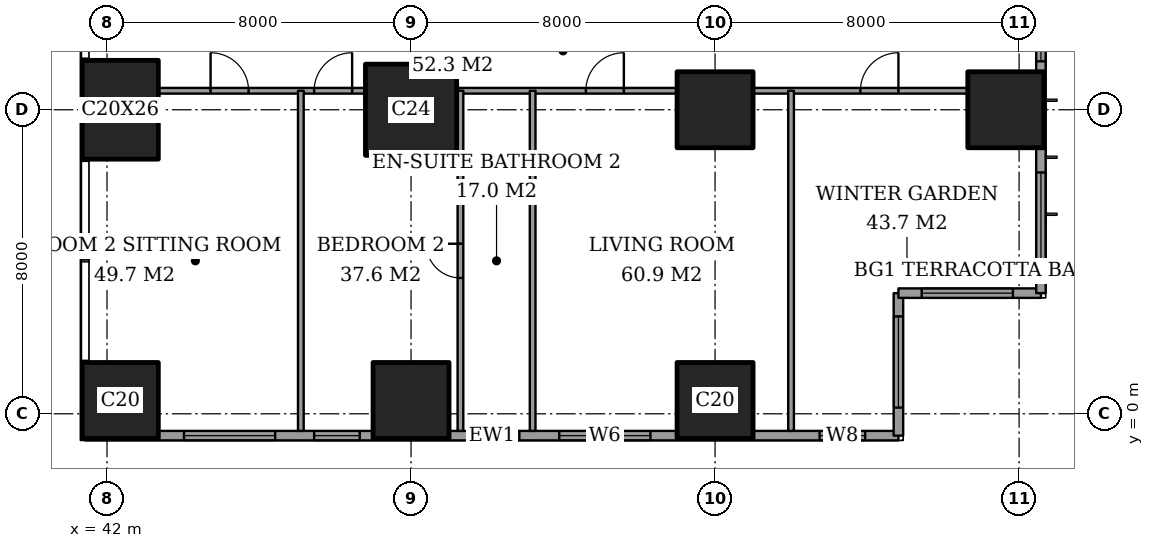
"""IFC4 building model, lengths in metres.
Left out: names, types, materials, properties, quantities, classifications, styles, units other than length and angle.
Written with IfcOpenShell. Run it as: python <this file> out.ifc"""

import sys

from ifc_helpers import new_model, si_unit, direction, frame, frame_2d, origin, origin_2d, place, context, subcontext, project, spatial, rectangle, extrude, element, fill, save


model = new_model("IFC4")
c1 = context("Model", 3, precision=1e-05, world=origin(), true_north=direction((0.0, 1.0)))
c2 = subcontext(c1, "Body", "Model", "MODEL_VIEW")
j1 = project(units=[si_unit("LENGTHUNIT", "METRE"), si_unit("PLANEANGLEUNIT", "RADIAN")], contexts=[c1])
p1 = place(None, origin())
s1 = spatial("IfcSite", under=j1, at=p1, CompositionType="ELEMENT")
p2 = place(p1, origin())
s2 = spatial("IfcBuilding", under=s1, at=p2, CompositionType="ELEMENT")
p3 = place(p2, frame((0.0, 0.0, 58.4)))
s3 = spatial("IfcBuildingStorey", under=s2, at=p3, CompositionType="ELEMENT", Elevation=58.4)
p4 = place(p3, frame((42.35, 0.35, 0.0), z_axis=(0.0, 0.0, 1.0), x_axis=(1.0, 0.0, 0.0)))
e1 = element("IfcColumn", 1, at=p4, inside=s3, PredefinedType="COLUMN", context=c2, shape_type="SweptSolid", body=[
    extrude(rectangle(XDim=2.0, YDim=2.0, at=origin_2d()), origin(), (0.0, 0.0, 1.0), 3.6),
])
p5 = place(p3, frame((42.35, 8.0, 0.0), z_axis=(0.0, 0.0, 1.0), x_axis=(1.0, 0.0, 0.0)))
e2 = element("IfcColumn", 2, at=p5, inside=s3, PredefinedType="COLUMN", context=c2, shape_type="SweptSolid", body=[
    extrude(rectangle(XDim=2.0, YDim=2.6, at=origin_2d()), origin(), (0.0, 0.0, 1.0), 3.6),
])
p6 = place(p3, frame((50.0, 0.35, 0.0), z_axis=(0.0, 0.0, 1.0), x_axis=(1.0, 0.0, 0.0)))
e3 = element("IfcColumn", 3, at=p6, inside=s3, PredefinedType="COLUMN", context=c2, shape_type="SweptSolid", body=[
    extrude(rectangle(XDim=2.0, YDim=2.0, at=origin_2d()), origin(), (0.0, 0.0, 1.0), 3.6),
])
p7 = place(p3, frame((50.0, 8.0, 0.0), z_axis=(0.0, 0.0, 1.0), x_axis=(1.0, 0.0, 0.0)))
e4 = element("IfcColumn", 4, at=p7, inside=s3, PredefinedType="COLUMN", context=c2, shape_type="SweptSolid", body=[
    extrude(rectangle(XDim=2.4, YDim=2.4, at=origin_2d()), origin(), (0.0, 0.0, 1.0), 3.6),
])
for number, where, z_axis, x_axis in (
    (5, (58.0, 0.35, 0.0), (0.0, 0.0, 1.0), (1.0, 0.0, 0.0)),
    (6, (58.0, 8.0, 0.0), (0.0, 0.0, 1.0), (1.0, 0.0, 0.0)),
    (7, (65.65, 8.0, 0.0), (0.0, 0.0, 1.0), (1.0, 0.0, 0.0)),
):
    element("IfcColumn", number, at=place(p3, frame(where, z_axis=z_axis, x_axis=x_axis)), inside=s3, PredefinedType="COLUMN", context=c2, shape_type="SweptSolid", body=[
        extrude(rectangle(XDim=2.0, YDim=2.0, at=origin_2d()), origin(), (0.0, 0.0, 1.0), 3.6),
    ])
p8 = place(p3, frame((41.425, -0.575, 0.0), z_axis=(0.0, 0.0, 1.0), x_axis=(1.0, 0.0, 0.0)))
e8 = element("IfcWall", 8, at=p8, inside=s3, PredefinedType="SOLIDWALL", context=c2, shape_type="SweptSolid", body=[
    extrude(rectangle(XDim=21.4, YDim=0.25, at=frame_2d((10.7, 0.0))), origin(), (0.0, 0.0, 1.0), 3.6),
])
p9 = place(p8, frame((2.6, 0.0, 0.6)))
e9 = element("IfcOpeningElement", 9, at=p9, cuts=e8, PredefinedType="OPENING", context=c2, shape_type="SweptSolid", body=[
    extrude(rectangle(XDim=2.4, YDim=2.0, at=frame_2d((1.2, 1.0))), frame((0.0, 0.135, 0.0), z_axis=(0.0, -1.0, 0.0), x_axis=(1.0, 0.0, 0.0)), (0.0, 0.0, 1.0), 0.27),
])
p10 = place(p8, frame((6.025, 0.0, 0.6)))
e10 = element("IfcOpeningElement", 10, at=p10, cuts=e8, PredefinedType="OPENING", context=c2, shape_type="SweptSolid", body=[
    extrude(rectangle(XDim=1.2, YDim=2.0, at=frame_2d((0.6, 1.0))), frame((0.0, 0.135, 0.0), z_axis=(0.0, -1.0, 0.0), x_axis=(1.0, 0.0, 0.0)), (0.0, 0.0, 1.0), 0.27),
])
p11 = place(p8, frame((10.225, 0.0, 0.6)))
e11 = element("IfcOpeningElement", 11, at=p11, cuts=e8, PredefinedType="OPENING", context=c2, shape_type="SweptSolid", body=[
    extrude(rectangle(XDim=1.2, YDim=2.0, at=frame_2d((0.6, 1.0))), frame((0.0, 0.135, 0.0), z_axis=(0.0, -1.0, 0.0), x_axis=(1.0, 0.0, 0.0)), (0.0, 0.0, 1.0), 0.27),
])
p12 = place(p8, frame((12.475, 0.0, 0.6)))
e12 = element("IfcOpeningElement", 12, at=p12, cuts=e8, PredefinedType="OPENING", context=c2, shape_type="SweptSolid", body=[
    extrude(rectangle(XDim=2.4, YDim=2.0, at=frame_2d((1.2, 1.0))), frame((0.0, 0.135, 0.0), z_axis=(0.0, -1.0, 0.0), x_axis=(1.0, 0.0, 0.0)), (0.0, 0.0, 1.0), 0.27),
])
p13 = place(p8, frame((19.325, 0.0, 0.6)))
e13 = element("IfcOpeningElement", 13, at=p13, cuts=e8, PredefinedType="OPENING", context=c2, shape_type="SweptSolid", body=[
    extrude(rectangle(XDim=1.2, YDim=2.0, at=frame_2d((0.6, 1.0))), frame((0.0, 0.135, 0.0), z_axis=(0.0, -1.0, 0.0), x_axis=(1.0, 0.0, 0.0)), (0.0, 0.0, 1.0), 0.27),
])
p14 = place(p3, frame((62.825, -0.575, 0.0), z_axis=(0.0, 0.0, 1.0), x_axis=(0.0, 1.0, 0.0)))
e14 = element("IfcWall", 14, at=p14, inside=s3, PredefinedType="SOLIDWALL", context=c2, shape_type="SweptSolid", body=[
    extrude(rectangle(XDim=3.75, YDim=0.25, at=frame_2d((1.875, 0.0))), origin(), (0.0, 0.0, 1.0), 3.6),
])
p15 = place(p14, frame((0.738, 0.0, 0.6)))
e15 = element("IfcOpeningElement", 15, at=p15, cuts=e14, PredefinedType="OPENING", context=c2, shape_type="SweptSolid", body=[
    extrude(rectangle(XDim=2.4, YDim=2.0, at=frame_2d((1.2, 1.0))), frame((0.0, 0.135, 0.0), z_axis=(0.0, -1.0, 0.0), x_axis=(1.0, 0.0, 0.0)), (0.0, 0.0, 1.0), 0.27),
])
p16 = place(p3, frame((62.825, 3.175, 0.0), z_axis=(0.0, 0.0, 1.0), x_axis=(1.0, 0.0, 0.0)))
e16 = element("IfcWall", 16, at=p16, inside=s3, PredefinedType="SOLIDWALL", context=c2, shape_type="SweptSolid", body=[
    extrude(rectangle(XDim=3.75, YDim=0.25, at=frame_2d((1.875, 0.0))), origin(), (0.0, 0.0, 1.0), 3.6),
])
p17 = place(p16, frame((0.613, 0.0, 0.6)))
e17 = element("IfcOpeningElement", 17, at=p17, cuts=e16, PredefinedType="OPENING", context=c2, shape_type="SweptSolid", body=[
    extrude(rectangle(XDim=2.4, YDim=2.0, at=frame_2d((1.2, 1.0))), frame((0.0, 0.135, 0.0), z_axis=(0.0, -1.0, 0.0), x_axis=(1.0, 0.0, 0.0)), (0.0, 0.0, 1.0), 0.27),
])
p18 = place(p3, frame((66.575, 3.175, 0.0), z_axis=(0.0, 0.0, 1.0), x_axis=(0.0, 1.0, 0.0)))
e18 = element("IfcWall", 18, at=p18, inside=s3, PredefinedType="SOLIDWALL", context=c2, shape_type="SweptSolid", body=[
    extrude(rectangle(XDim=41.65, YDim=0.25, at=frame_2d((20.825, 0.0))), origin(), (0.0, 0.0, 1.0), 3.6),
])
p19 = place(p18, frame((0.775, 0.0, 0.6)))
e19 = element("IfcOpeningElement", 19, at=p19, cuts=e18, PredefinedType="OPENING", context=c2, shape_type="SweptSolid", body=[
    extrude(rectangle(XDim=2.4, YDim=2.0, at=frame_2d((1.2, 1.0))), frame((0.0, 0.135, 0.0), z_axis=(0.0, -1.0, 0.0), x_axis=(1.0, 0.0, 0.0)), (0.0, 0.0, 1.0), 0.27),
])
p20 = place(p18, frame((6.1, 0.0, 0.6)))
e20 = element("IfcOpeningElement", 20, at=p20, cuts=e18, PredefinedType="OPENING", context=c2, shape_type="SweptSolid", body=[
    extrude(rectangle(XDim=1.2, YDim=2.0, at=frame_2d((0.6, 1.0))), frame((0.0, 0.135, 0.0), z_axis=(0.0, -1.0, 0.0), x_axis=(1.0, 0.0, 0.0)), (0.0, 0.0, 1.0), 0.27),
])
p21 = place(p18, frame((8.275, 0.0, 0.6)))
e21 = element("IfcOpeningElement", 21, at=p21, cuts=e18, PredefinedType="OPENING", context=c2, shape_type="SweptSolid", body=[
    extrude(rectangle(XDim=2.4, YDim=2.0, at=frame_2d((1.2, 1.0))), frame((0.0, 0.135, 0.0), z_axis=(0.0, -1.0, 0.0), x_axis=(1.0, 0.0, 0.0)), (0.0, 0.0, 1.0), 0.27),
])
p22 = place(p18, frame((15.775, 0.0, 0.6)))
e22 = element("IfcOpeningElement", 22, at=p22, cuts=e18, PredefinedType="OPENING", context=c2, shape_type="SweptSolid", body=[
    extrude(rectangle(XDim=2.4, YDim=2.0, at=frame_2d((1.2, 1.0))), frame((0.0, 0.135, 0.0), z_axis=(0.0, -1.0, 0.0), x_axis=(1.0, 0.0, 0.0)), (0.0, 0.0, 1.0), 0.27),
])
p23 = place(p18, frame((23.475, 0.0, 0.6)))
e23 = element("IfcOpeningElement", 23, at=p23, cuts=e18, PredefinedType="OPENING", context=c2, shape_type="SweptSolid", body=[
    extrude(rectangle(XDim=2.4, YDim=2.0, at=frame_2d((1.2, 1.0))), frame((0.0, 0.135, 0.0), z_axis=(0.0, -1.0, 0.0), x_axis=(1.0, 0.0, 0.0)), (0.0, 0.0, 1.0), 0.27),
])
p24 = place(p18, frame((30.875, 0.0, 0.6)))
e24 = element("IfcOpeningElement", 24, at=p24, cuts=e18, PredefinedType="OPENING", context=c2, shape_type="SweptSolid", body=[
    extrude(rectangle(XDim=2.4, YDim=2.0, at=frame_2d((1.2, 1.0))), frame((0.0, 0.135, 0.0), z_axis=(0.0, -1.0, 0.0), x_axis=(1.0, 0.0, 0.0)), (0.0, 0.0, 1.0), 0.27),
])
p25 = place(p18, frame((34.325, 0.0, 0.6)))
e25 = element("IfcOpeningElement", 25, at=p25, cuts=e18, PredefinedType="OPENING", context=c2, shape_type="SweptSolid", body=[
    extrude(rectangle(XDim=1.2, YDim=2.0, at=frame_2d((0.6, 1.0))), frame((0.0, 0.135, 0.0), z_axis=(0.0, -1.0, 0.0), x_axis=(1.0, 0.0, 0.0)), (0.0, 0.0, 1.0), 0.27),
])
p26 = place(p18, frame((38.475, 0.0, 0.6)))
e26 = element("IfcOpeningElement", 26, at=p26, cuts=e18, PredefinedType="OPENING", context=c2, shape_type="SweptSolid", body=[
    extrude(rectangle(XDim=2.4, YDim=2.0, at=frame_2d((1.2, 1.0))), frame((0.0, 0.135, 0.0), z_axis=(0.0, -1.0, 0.0), x_axis=(1.0, 0.0, 0.0)), (0.0, 0.0, 1.0), 0.27),
])
p27 = place(p3, frame((43.35, 8.5, 0.0), z_axis=(0.0, 0.0, 1.0), x_axis=(1.0, 0.0, 0.0)))
e27 = element("IfcWall", 27, at=p27, inside=s3, PredefinedType="PARTITIONING", context=c2, shape_type="SweptSolid", body=[
    extrude(rectangle(XDim=5.45, YDim=0.15, at=frame_2d((2.725, 0.0))), origin(), (0.0, 0.0, 1.0), 3.35),
])
p28 = place(p27, frame((4.1, 0.0, 0.0)))
e28 = element("IfcOpeningElement", 28, at=p28, cuts=e27, PredefinedType="OPENING", context=c2, shape_type="SweptSolid", body=[
    extrude(rectangle(XDim=1.0, YDim=2.1, at=frame_2d((0.5, 1.05))), frame((0.0, 0.085, 0.0), z_axis=(0.0, -1.0, 0.0), x_axis=(1.0, 0.0, 0.0)), (0.0, 0.0, 1.0), 0.17),
])
p29 = place(p27, frame((1.375, 0.0, 0.0)))
e29 = element("IfcOpeningElement", 29, at=p29, cuts=e27, PredefinedType="OPENING", context=c2, shape_type="SweptSolid", body=[
    extrude(rectangle(XDim=1.0, YDim=2.1, at=frame_2d((0.5, 1.05))), frame((0.0, 0.085, 0.0), z_axis=(0.0, -1.0, 0.0), x_axis=(1.0, 0.0, 0.0)), (0.0, 0.0, 1.0), 0.17),
])
p30 = place(p3, frame((51.2, 8.5, 0.0), z_axis=(0.0, 0.0, 1.0), x_axis=(1.0, 0.0, 0.0)))
e30 = element("IfcWall", 30, at=p30, inside=s3, PredefinedType="PARTITIONING", context=c2, shape_type="SweptSolid", body=[
    extrude(rectangle(XDim=5.8, YDim=0.15, at=frame_2d((2.9, 0.0))), origin(), (0.0, 0.0, 1.0), 3.35),
])
p31 = place(p30, frame((3.4, 0.0, 0.0)))
e31 = element("IfcOpeningElement", 31, at=p31, cuts=e30, PredefinedType="OPENING", context=c2, shape_type="SweptSolid", body=[
    extrude(rectangle(XDim=1.0, YDim=2.1, at=frame_2d((0.5, 1.05))), frame((0.0, 0.085, 0.0), z_axis=(0.0, -1.0, 0.0), x_axis=(1.0, 0.0, 0.0)), (0.0, 0.0, 1.0), 0.17),
])
p32 = place(p3, frame((59.0, 8.5, 0.0), z_axis=(0.0, 0.0, 1.0), x_axis=(1.0, 0.0, 0.0)))
e32 = element("IfcWall", 32, at=p32, inside=s3, PredefinedType="PARTITIONING", context=c2, shape_type="SweptSolid", body=[
    extrude(rectangle(XDim=5.65, YDim=0.15, at=frame_2d((2.825, 0.0))), origin(), (0.0, 0.0, 1.0), 3.35),
])
p33 = place(p32, frame((2.825, 0.0, 0.0)))
e33 = element("IfcOpeningElement", 33, at=p33, cuts=e32, PredefinedType="OPENING", context=c2, shape_type="SweptSolid", body=[
    extrude(rectangle(XDim=1.0, YDim=2.1, at=frame_2d((0.5, 1.05))), frame((0.0, 0.085, 0.0), z_axis=(0.0, -1.0, 0.0), x_axis=(1.0, 0.0, 0.0)), (0.0, 0.0, 1.0), 0.17),
])
p34 = place(p3, frame((47.1, -0.45, 0.0), z_axis=(0.0, 0.0, 1.0), x_axis=(0.0, 1.0, 0.0)))
e34 = element("IfcWall", 34, at=p34, inside=s3, PredefinedType="PARTITIONING", context=c2, shape_type="SweptSolid", body=[
    extrude(rectangle(XDim=8.95, YDim=0.15, at=frame_2d((4.475, 0.0))), origin(), (0.0, 0.0, 1.0), 3.35),
])
p35 = place(p3, frame((51.3, -0.45, 0.0), z_axis=(0.0, 0.0, 1.0), x_axis=(0.0, 1.0, 0.0)))
e35 = element("IfcWall", 35, at=p35, inside=s3, PredefinedType="PARTITIONING", context=c2, shape_type="SweptSolid", body=[
    extrude(rectangle(XDim=8.95, YDim=0.15, at=frame_2d((4.475, 0.0))), origin(), (0.0, 0.0, 1.0), 3.35),
])
p36 = place(p35, frame((4.025, 0.0, 0.0)))
e36 = element("IfcOpeningElement", 36, at=p36, cuts=e35, PredefinedType="OPENING", context=c2, shape_type="SweptSolid", body=[
    extrude(rectangle(XDim=0.9, YDim=2.1, at=frame_2d((0.45, 1.05))), frame((0.0, 0.085, 0.0), z_axis=(0.0, -1.0, 0.0), x_axis=(1.0, 0.0, 0.0)), (0.0, 0.0, 1.0), 0.17),
])
for number, where, z_axis, x_axis in (
    (37, (53.2, -0.45, 0.0), (0.0, 0.0, 1.0), (0.0, 1.0, 0.0)),
    (38, (60.0, -0.45, 0.0), (0.0, 0.0, 1.0), (0.0, 1.0, 0.0)),
):
    element("IfcWall", number, at=place(p3, frame(where, z_axis=z_axis, x_axis=x_axis)), inside=s3, PredefinedType="PARTITIONING", context=c2, shape_type="SweptSolid", body=[
        extrude(rectangle(XDim=8.95, YDim=0.15, at=frame_2d((4.475, 0.0))), origin(), (0.0, 0.0, 1.0), 3.35),
    ])
p37 = place(p9, origin())
e39 = element("IfcWindow", 39, at=p37, inside=s3, PartitioningType="SINGLE_PANEL", PredefinedType="WINDOW", context=c2, shape_type="SweptSolid", body=[
    extrude(rectangle(XDim=2.4, YDim=2.0, at=frame_2d((1.2, 1.0))), frame((0.0, 0.03, 0.0), z_axis=(0.0, -1.0, 0.0), x_axis=(1.0, 0.0, 0.0)), (0.0, 0.0, 1.0), 0.06),
])
fill(e9, e39)
p38 = place(p10, origin())
e40 = element("IfcWindow", 40, at=p38, inside=s3, PartitioningType="SINGLE_PANEL", PredefinedType="WINDOW", context=c2, shape_type="SweptSolid", body=[
    extrude(rectangle(XDim=1.2, YDim=2.0, at=frame_2d((0.6, 1.0))), frame((0.0, 0.03, 0.0), z_axis=(0.0, -1.0, 0.0), x_axis=(1.0, 0.0, 0.0)), (0.0, 0.0, 1.0), 0.06),
])
fill(e10, e40)
p39 = place(p11, origin())
e41 = element("IfcWindow", 41, at=p39, inside=s3, PartitioningType="SINGLE_PANEL", PredefinedType="WINDOW", context=c2, shape_type="SweptSolid", body=[
    extrude(rectangle(XDim=1.2, YDim=2.0, at=frame_2d((0.6, 1.0))), frame((0.0, 0.03, 0.0), z_axis=(0.0, -1.0, 0.0), x_axis=(1.0, 0.0, 0.0)), (0.0, 0.0, 1.0), 0.06),
])
fill(e11, e41)
p40 = place(p12, origin())
e42 = element("IfcWindow", 42, at=p40, inside=s3, PartitioningType="SINGLE_PANEL", PredefinedType="WINDOW", context=c2, shape_type="SweptSolid", body=[
    extrude(rectangle(XDim=2.4, YDim=2.0, at=frame_2d((1.2, 1.0))), frame((0.0, 0.03, 0.0), z_axis=(0.0, -1.0, 0.0), x_axis=(1.0, 0.0, 0.0)), (0.0, 0.0, 1.0), 0.06),
])
fill(e12, e42)
p41 = place(p13, origin())
e43 = element("IfcWindow", 43, at=p41, inside=s3, PartitioningType="SINGLE_PANEL", PredefinedType="WINDOW", context=c2, shape_type="SweptSolid", body=[
    extrude(rectangle(XDim=1.2, YDim=2.0, at=frame_2d((0.6, 1.0))), frame((0.0, 0.03, 0.0), z_axis=(0.0, -1.0, 0.0), x_axis=(1.0, 0.0, 0.0)), (0.0, 0.0, 1.0), 0.06),
])
fill(e13, e43)
p42 = place(p15, origin())
e44 = element("IfcWindow", 44, at=p42, inside=s3, PartitioningType="SINGLE_PANEL", PredefinedType="WINDOW", context=c2, shape_type="SweptSolid", body=[
    extrude(rectangle(XDim=2.4, YDim=2.0, at=frame_2d((1.2, 1.0))), frame((0.0, 0.03, 0.0), z_axis=(0.0, -1.0, 0.0), x_axis=(1.0, 0.0, 0.0)), (0.0, 0.0, 1.0), 0.06),
])
fill(e15, e44)
p43 = place(p17, origin())
e45 = element("IfcWindow", 45, at=p43, inside=s3, PartitioningType="SINGLE_PANEL", PredefinedType="WINDOW", context=c2, shape_type="SweptSolid", body=[
    extrude(rectangle(XDim=2.4, YDim=2.0, at=frame_2d((1.2, 1.0))), frame((0.0, 0.03, 0.0), z_axis=(0.0, -1.0, 0.0), x_axis=(1.0, 0.0, 0.0)), (0.0, 0.0, 1.0), 0.06),
])
fill(e17, e45)
p44 = place(p19, origin())
e46 = element("IfcWindow", 46, at=p44, inside=s3, PartitioningType="SINGLE_PANEL", PredefinedType="WINDOW", context=c2, shape_type="SweptSolid", body=[
    extrude(rectangle(XDim=2.4, YDim=2.0, at=frame_2d((1.2, 1.0))), frame((0.0, 0.03, 0.0), z_axis=(0.0, -1.0, 0.0), x_axis=(1.0, 0.0, 0.0)), (0.0, 0.0, 1.0), 0.06),
])
fill(e19, e46)
p45 = place(p20, origin())
e47 = element("IfcWindow", 47, at=p45, inside=s3, PartitioningType="SINGLE_PANEL", PredefinedType="WINDOW", context=c2, shape_type="SweptSolid", body=[
    extrude(rectangle(XDim=1.2, YDim=2.0, at=frame_2d((0.6, 1.0))), frame((0.0, 0.03, 0.0), z_axis=(0.0, -1.0, 0.0), x_axis=(1.0, 0.0, 0.0)), (0.0, 0.0, 1.0), 0.06),
])
fill(e20, e47)
p46 = place(p33, origin())
e48 = element("IfcDoor", 48, at=p46, inside=s3, OperationType="SINGLE_SWING_LEFT", PredefinedType="DOOR", context=c2, shape_type="SweptSolid", body=[
    extrude(rectangle(XDim=1.0, YDim=2.1, at=frame_2d((0.5, 1.05))), frame((0.0, 0.025, 0.0), z_axis=(0.0, -1.0, 0.0), x_axis=(1.0, 0.0, 0.0)), (0.0, 0.0, 1.0), 0.05),
])
fill(e33, e48)
p47 = place(p31, origin())
e49 = element("IfcDoor", 49, at=p47, inside=s3, OperationType="SINGLE_SWING_LEFT", PredefinedType="DOOR", context=c2, shape_type="SweptSolid", body=[
    extrude(rectangle(XDim=1.0, YDim=2.1, at=frame_2d((0.5, 1.05))), frame((0.0, 0.025, 0.0), z_axis=(0.0, -1.0, 0.0), x_axis=(1.0, 0.0, 0.0)), (0.0, 0.0, 1.0), 0.05),
])
fill(e31, e49)
p48 = place(p36, origin())
e50 = element("IfcDoor", 50, at=p48, inside=s3, OperationType="SINGLE_SWING_LEFT", PredefinedType="DOOR", context=c2, shape_type="SweptSolid", body=[
    extrude(rectangle(XDim=0.9, YDim=2.1, at=frame_2d((0.45, 1.05))), frame((0.0, 0.025, 0.0), z_axis=(0.0, -1.0, 0.0), x_axis=(1.0, 0.0, 0.0)), (0.0, 0.0, 1.0), 0.05),
])
fill(e36, e50)
p49 = place(p28, origin())
e51 = element("IfcDoor", 51, at=p49, inside=s3, OperationType="SINGLE_SWING_LEFT", PredefinedType="DOOR", context=c2, shape_type="SweptSolid", body=[
    extrude(rectangle(XDim=1.0, YDim=2.1, at=frame_2d((0.5, 1.05))), frame((0.0, 0.025, 0.0), z_axis=(0.0, -1.0, 0.0), x_axis=(1.0, 0.0, 0.0)), (0.0, 0.0, 1.0), 0.05),
])
fill(e28, e51)
p50 = place(p29, origin())
e52 = element("IfcDoor", 52, at=p50, inside=s3, OperationType="SINGLE_SWING_RIGHT", PredefinedType="DOOR", context=c2, shape_type="SweptSolid", body=[
    extrude(rectangle(XDim=1.0, YDim=2.1, at=frame_2d((0.5, 1.05))), frame((0.0, 0.025, 0.0), z_axis=(0.0, -1.0, 0.0), x_axis=(1.0, 0.0, 0.0)), (0.0, 0.0, 1.0), 0.05),
])
fill(e29, e52)
save(model, sys.argv[1])
